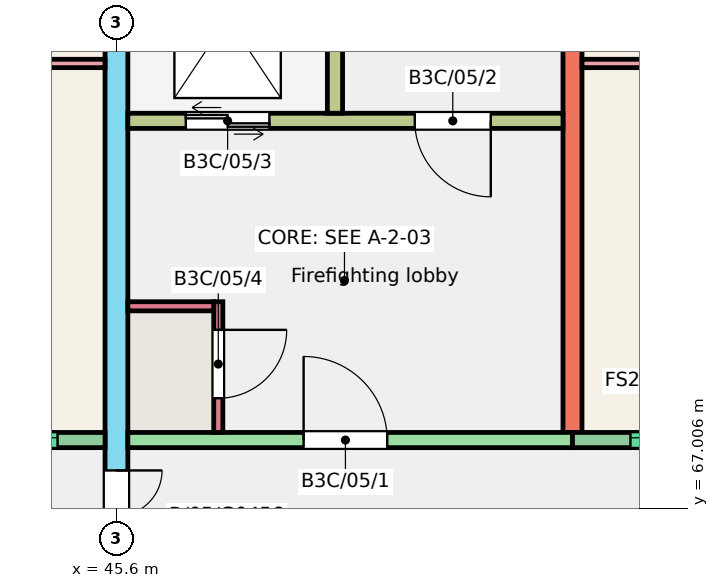
"""IFC4 building model, lengths in metres.
Left out: names, types, materials, properties, quantities, classifications, styles, units other than length and angle.
Written with IfcOpenShell. Run it as: python <this file> out.ifc"""

import sys

from ifc_helpers import new_model, si_unit, direction, frame, frame_2d, origin, place, context, subcontext, project, spatial, rectangle, extrude, element, fill, save


model = new_model("IFC4")
c1 = context("Model", 3, precision=1e-05, world=origin(), true_north=direction((0.0, 1.0)))
c2 = subcontext(c1, "Body", "Model", "MODEL_VIEW")
j1 = project(units=[si_unit("LENGTHUNIT", "METRE"), si_unit("PLANEANGLEUNIT", "RADIAN")], contexts=[c1])
p1 = place(None, origin())
s1 = spatial("IfcSite", under=j1, at=p1, CompositionType="ELEMENT")
p2 = place(p1, origin())
s2 = spatial("IfcBuilding", under=s1, at=p2, CompositionType="ELEMENT")
p3 = place(p2, frame((0.0, 0.0, 15.0)))
s3 = spatial("IfcBuildingStorey", under=s2, at=p3, CompositionType="ELEMENT", Elevation=15.0)
p4 = place(p3, frame((45.6, 66.0, 0.0), z_axis=(0.0, 0.0, 1.0), x_axis=(0.0, 1.0, 0.0)))
e1 = element("IfcWall", 1, at=p4, inside=s3, PredefinedType="SHEAR", context=c2, shape_type="SweptSolid", body=[
    extrude(rectangle(XDim=11.0, YDim=0.3, at=frame_2d((5.5, 0.0))), origin(), (0.0, 0.0, 1.0), 3.0),
])
p5 = place(p4, frame((0.3, 0.0, 0.0)))
e2 = element("IfcOpeningElement", 2, at=p5, cuts=e1, PredefinedType="OPENING", context=c2, shape_type="SweptSolid", body=[
    extrude(rectangle(XDim=1.2, YDim=2.1, at=frame_2d((0.6, 1.05))), frame((0.0, 0.16, 0.0), z_axis=(0.0, -1.0, 0.0), x_axis=(1.0, 0.0, 0.0)), (0.0, 0.0, 1.0), 0.32),
])
p6 = place(p3, frame((51.6, 68.0, 0.0), z_axis=(0.0, 0.0, 1.0), x_axis=(0.0, 1.0, 0.0)))
e3 = element("IfcWall", 3, at=p6, inside=s3, PredefinedType="SHEAR", context=c2, shape_type="SweptSolid", body=[
    extrude(rectangle(XDim=9.0, YDim=0.25, at=frame_2d((4.5, 0.0))), origin(), (0.0, 0.0, 1.0), 3.0),
])
p7 = place(p3, frame((42.0, 67.9, 0.0), z_axis=(0.0, 0.0, 1.0), x_axis=(1.0, 0.0, 0.0)))
e4 = element("IfcWall", 4, at=p7, inside=s3, PredefinedType="SOLIDWALL", context=c2, shape_type="SweptSolid", body=[
    extrude(rectangle(XDim=3.45, YDim=0.2, at=frame_2d((1.725, 0.0))), origin(), (0.0, 0.0, 1.0), 3.0),
])
p8 = place(p7, frame((0.725, 0.0, 1.2)))
e5 = element("IfcOpeningElement", 5, at=p8, cuts=e4, PredefinedType="OPENING", context=c2, shape_type="SweptSolid", body=[
    extrude(rectangle(XDim=2.1, YDim=1.2, at=frame_2d((1.05, 0.6))), frame((0.0, 0.11, 0.0), z_axis=(0.0, -1.0, 0.0), x_axis=(1.0, 0.0, 0.0)), (0.0, 0.0, 1.0), 0.22),
])
p9 = place(p3, frame((45.75, 67.9, 0.0), z_axis=(0.0, 0.0, 1.0), x_axis=(1.0, 0.0, 0.0)))
e6 = element("IfcWall", 6, at=p9, inside=s3, PredefinedType="SHEAR", context=c2, shape_type="SweptSolid", body=[
    extrude(rectangle(XDim=5.85, YDim=0.2, at=frame_2d((2.925, 0.0))), origin(), (0.0, 0.0, 1.0), 3.0),
])
p10 = place(p9, frame((2.312, 0.0, 0.0)))
e7 = element("IfcOpeningElement", 7, at=p10, cuts=e6, PredefinedType="OPENING", context=c2, shape_type="SweptSolid", body=[
    extrude(rectangle(XDim=1.1, YDim=2.1, at=frame_2d((0.55, 1.05))), frame((0.0, 0.11, 0.0), z_axis=(0.0, -1.0, 0.0), x_axis=(1.0, 0.0, 0.0)), (0.0, 0.0, 1.0), 0.22),
])
p11 = place(p3, frame((45.75, 72.1, 0.0), z_axis=(0.0, 0.0, 1.0), x_axis=(1.0, 0.0, 0.0)))
e8 = element("IfcWall", 8, at=p11, inside=s3, PredefinedType="SHEAR", context=c2, shape_type="SweptSolid", body=[
    extrude(rectangle(XDim=5.725, YDim=0.2, at=frame_2d((2.863, 0.0))), origin(), (0.0, 0.0, 1.0), 3.0),
])
p12 = place(p11, frame((3.775, 0.0, 0.0)))
e9 = element("IfcOpeningElement", 9, at=p12, cuts=e8, PredefinedType="OPENING", context=c2, shape_type="SweptSolid", body=[
    extrude(rectangle(XDim=1.0, YDim=2.1, at=frame_2d((0.5, 1.05))), frame((0.0, 0.11, 0.0), z_axis=(0.0, -1.0, 0.0), x_axis=(1.0, 0.0, 0.0)), (0.0, 0.0, 1.0), 0.22),
])
p13 = place(p11, frame((0.762, 0.0, 0.0)))
e10 = element("IfcOpeningElement", 10, at=p13, cuts=e8, PredefinedType="OPENING", context=c2, shape_type="SweptSolid", body=[
    extrude(rectangle(XDim=1.1, YDim=2.1, at=frame_2d((0.55, 1.05))), frame((0.0, 0.11, 0.0), z_axis=(0.0, -1.0, 0.0), x_axis=(1.0, 0.0, 0.0)), (0.0, 0.0, 1.0), 0.22),
])
p14 = place(p3, frame((48.475, 72.2, 0.0), z_axis=(0.0, 0.0, 1.0), x_axis=(0.0, 1.0, 0.0)))
e11 = element("IfcWall", 11, at=p14, inside=s3, PredefinedType="SHEAR", context=c2, shape_type="SweptSolid", body=[
    extrude(rectangle(XDim=4.8, YDim=0.2, at=frame_2d((2.4, 0.0))), origin(), (0.0, 0.0, 1.0), 3.0),
])
p15 = place(p3, frame((46.94, 68.0, 0.0), z_axis=(0.0, 0.0, 1.0), x_axis=(0.0, 1.0, 0.0)))
e12 = element("IfcWall", 12, at=p15, inside=s3, PredefinedType="SHEAR", context=c2, shape_type="SweptSolid", body=[
    extrude(rectangle(XDim=1.72, YDim=0.12, at=frame_2d((0.86, 0.0))), origin(), (0.0, 0.0, 1.0), 3.0),
])
p16 = place(p15, frame((0.45, 0.0, 0.0)))
e13 = element("IfcOpeningElement", 13, at=p16, cuts=e12, PredefinedType="OPENING", context=c2, shape_type="SweptSolid", body=[
    extrude(rectangle(XDim=0.9, YDim=2.1, at=frame_2d((0.45, 1.05))), frame((0.0, 0.07, 0.0), z_axis=(0.0, -1.0, 0.0), x_axis=(1.0, 0.0, 0.0)), (0.0, 0.0, 1.0), 0.14),
])
p17 = place(p3, frame((45.75, 69.66, 0.0), z_axis=(0.0, 0.0, 1.0), x_axis=(1.0, 0.0, 0.0)))
e14 = element("IfcWall", 14, at=p17, inside=s3, PredefinedType="SHEAR", context=c2, shape_type="SweptSolid", body=[
    extrude(rectangle(XDim=1.13, YDim=0.12, at=frame_2d((0.565, 0.0))), origin(), (0.0, 0.0, 1.0), 3.0),
])
p18 = place(p3, frame((51.6, 67.9, 0.0), z_axis=(0.0, 0.0, 1.0), x_axis=(1.0, 0.0, 0.0)))
e15 = element("IfcWall", 15, at=p18, inside=s3, PredefinedType="SOLIDWALL", context=c2, shape_type="SweptSolid", body=[
    extrude(rectangle(XDim=3.6, YDim=0.2, at=frame_2d((1.8, 0.0))), origin(), (0.0, 0.0, 1.0), 3.0),
])
p19 = place(p18, frame((0.762, 0.0, 1.2)))
e16 = element("IfcOpeningElement", 16, at=p19, cuts=e15, PredefinedType="OPENING", context=c2, shape_type="SweptSolid", body=[
    extrude(rectangle(XDim=2.1, YDim=1.2, at=frame_2d((1.05, 0.6))), frame((0.0, 0.11, 0.0), z_axis=(0.0, -1.0, 0.0), x_axis=(1.0, 0.0, 0.0)), (0.0, 0.0, 1.0), 0.22),
])
p20 = place(p3, frame((42.1, 72.855, 0.0), z_axis=(0.0, 0.0, 1.0), x_axis=(1.0, 0.0, 0.0)))
e17 = element("IfcWall", 17, at=p20, inside=s3, PredefinedType="PARTITIONING", context=c2, shape_type="SweptSolid", body=[
    extrude(rectangle(XDim=3.35, YDim=0.11, at=frame_2d((1.675, 0.0))), origin(), (0.0, 0.0, 1.0), 2.8),
])
p21 = place(p3, frame((51.725, 72.855, 0.0), z_axis=(0.0, 0.0, 1.0), x_axis=(1.0, 0.0, 0.0)))
e18 = element("IfcWall", 18, at=p21, inside=s3, PredefinedType="PARTITIONING", context=c2, shape_type="SweptSolid", body=[
    extrude(rectangle(XDim=3.375, YDim=0.11, at=frame_2d((1.688, 0.0))), origin(), (0.0, 0.0, 1.0), 2.8),
])
p22 = place(p8, origin())
e19 = element("IfcWindow", 19, at=p22, inside=s3, PartitioningType="SINGLE_PANEL", PredefinedType="WINDOW", context=c2, shape_type="SweptSolid", body=[
    extrude(rectangle(XDim=2.1, YDim=1.2, at=frame_2d((1.05, 0.6))), frame((0.0, 0.06, 0.0), z_axis=(0.0, -1.0, 0.0), x_axis=(1.0, 0.0, 0.0)), (0.0, 0.0, 1.0), 0.06),
])
fill(e5, e19)
p23 = place(p19, origin())
e20 = element("IfcWindow", 20, at=p23, inside=s3, PartitioningType="SINGLE_PANEL", PredefinedType="WINDOW", context=c2, shape_type="SweptSolid", body=[
    extrude(rectangle(XDim=2.1, YDim=1.2, at=frame_2d((1.05, 0.6))), frame((0.0, 0.06, 0.0), z_axis=(0.0, -1.0, 0.0), x_axis=(1.0, 0.0, 0.0)), (0.0, 0.0, 1.0), 0.06),
])
fill(e16, e20)
p24 = place(p10, origin())
e21 = element("IfcDoor", 21, at=p24, inside=s3, OperationType="SINGLE_SWING_LEFT", PredefinedType="DOOR", context=c2, shape_type="SweptSolid", body=[
    extrude(rectangle(XDim=1.1, YDim=2.1, at=frame_2d((0.55, 1.05))), frame((0.0, 0.025, 0.0), z_axis=(0.0, -1.0, 0.0), x_axis=(1.0, 0.0, 0.0)), (0.0, 0.0, 1.0), 0.05),
])
fill(e7, e21)
p25 = place(p12, origin())
e22 = element("IfcDoor", 22, at=p25, inside=s3, OperationType="SINGLE_SWING_RIGHT", PredefinedType="DOOR", context=c2, shape_type="SweptSolid", body=[
    extrude(rectangle(XDim=1.0, YDim=2.1, at=frame_2d((0.5, 1.05))), frame((0.0, 0.025, 0.0), z_axis=(0.0, -1.0, 0.0), x_axis=(1.0, 0.0, 0.0)), (0.0, 0.0, 1.0), 0.05),
])
fill(e9, e22)
p26 = place(p13, origin())
e23 = element("IfcDoor", 23, at=p26, inside=s3, OperationType="DOUBLE_DOOR_SLIDING", PredefinedType="DOOR", context=c2, shape_type="SweptSolid", body=[
    extrude(rectangle(XDim=1.1, YDim=2.1, at=frame_2d((0.55, 1.05))), frame((0.0, 0.025, 0.0), z_axis=(0.0, -1.0, 0.0), x_axis=(1.0, 0.0, 0.0)), (0.0, 0.0, 1.0), 0.05),
])
fill(e10, e23)
p27 = place(p16, origin())
e24 = element("IfcDoor", 24, at=p27, inside=s3, OperationType="SINGLE_SWING_RIGHT", PredefinedType="DOOR", context=c2, shape_type="SweptSolid", body=[
    extrude(rectangle(XDim=0.9, YDim=2.1, at=frame_2d((0.45, 1.05))), frame((0.0, 0.025, 0.0), z_axis=(0.0, -1.0, 0.0), x_axis=(1.0, 0.0, 0.0)), (0.0, 0.0, 1.0), 0.05),
])
fill(e13, e24)
p28 = place(p5, origin())
e25 = element("IfcDoor", 25, at=p28, inside=s3, OperationType="DOUBLE_DOOR_SINGLE_SWING", PredefinedType="DOOR", context=c2, shape_type="SweptSolid", body=[
    extrude(rectangle(XDim=1.2, YDim=2.1, at=frame_2d((0.6, 1.05))), frame((0.0, 0.025, 0.0), z_axis=(0.0, -1.0, 0.0), x_axis=(1.0, 0.0, 0.0)), (0.0, 0.0, 1.0), 0.05),
])
fill(e2, e25)
save(model, sys.argv[1])
